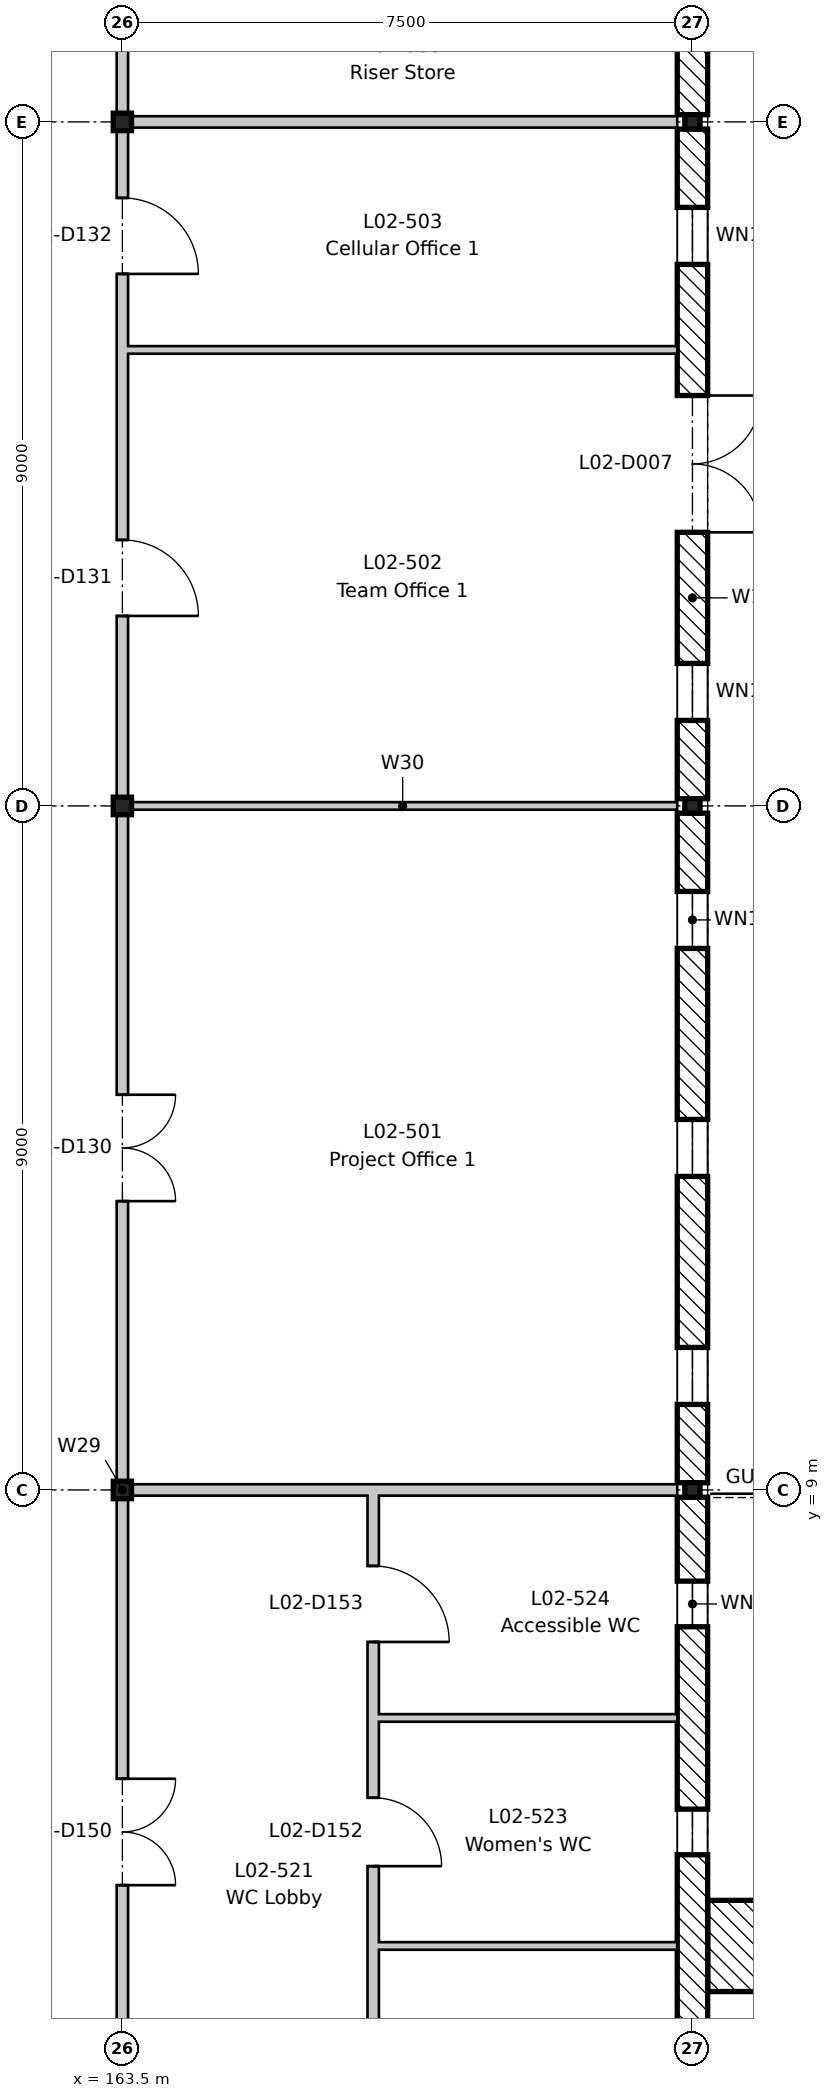
"""IFC4 building model, lengths in metres.
Left out: names, types, materials, properties, quantities, classifications, styles, units other than length and angle.
Written with IfcOpenShell. Run it as: python <this file> out.ifc"""

import sys

from ifc_helpers import new_model, si_unit, direction, frame, frame_2d, origin, origin_2d, place, context, subcontext, project, spatial, rectangle, i_section, extrude, element, fill, save


model = new_model("IFC4")
c1 = context("Model", 3, precision=1e-05, world=origin(), true_north=direction((0.0, 1.0)))
c2 = subcontext(c1, "Body", "Model", "MODEL_VIEW")
j1 = project(units=[si_unit("LENGTHUNIT", "METRE"), si_unit("PLANEANGLEUNIT", "RADIAN")], contexts=[c1])
p1 = place(None, origin())
s1 = spatial("IfcSite", under=j1, at=p1, CompositionType="ELEMENT")
p2 = place(p1, origin())
s2 = spatial("IfcBuilding", under=s1, at=p2, CompositionType="ELEMENT")
p3 = place(p2, frame((0.0, 0.0, 9.9)))
s3 = spatial("IfcBuildingStorey", under=s2, at=p3, CompositionType="ELEMENT", Elevation=9.9)
for number, where, z_axis, x_axis in (
    (1, (163.5, 9.0, -0.2), (0.0, 0.0, 1.0), (1.0, 0.0, 0.0)),
    (2, (163.5, 18.0, -0.2), (0.0, 0.0, 1.0), (1.0, 0.0, 0.0)),
    (3, (163.5, 27.0, -0.2), (0.0, 0.0, 1.0), (1.0, 0.0, 0.0)),
):
    element("IfcColumn", number, at=place(p3, frame(where, z_axis=z_axis, x_axis=x_axis)), inside=s3, PredefinedType="COLUMN", context=c2, shape_type="SweptSolid", body=[
        extrude(i_section(OverallWidth=0.24, OverallDepth=0.23, WebThickness=0.008, FlangeThickness=0.012, FilletRadius=0.021, at=origin_2d()), origin(), (0.0, 0.0, 1.0), 4.45),
    ])
for number, where, z_axis, x_axis in (
    (4, (171.0, 9.0, -0.2), (0.0, 0.0, 1.0), (1.0, 0.0, 0.0)),
    (5, (171.0, 18.0, -0.2), (0.0, 0.0, 1.0), (1.0, 0.0, 0.0)),
    (6, (171.0, 27.0, -0.2), (0.0, 0.0, 1.0), (1.0, 0.0, 0.0)),
):
    element("IfcColumn", number, at=place(p3, frame(where, z_axis=z_axis, x_axis=x_axis)), inside=s3, PredefinedType="COLUMN", context=c2, shape_type="SweptSolid", body=[
        extrude(i_section(OverallWidth=0.2, OverallDepth=0.19, WebThickness=0.007, FlangeThickness=0.01, FilletRadius=0.018, at=origin_2d()), origin(), (0.0, 0.0, 1.0), 4.45),
    ])
p4 = place(p3, frame((171.0, 8.905, 0.0), z_axis=(0.0, 0.0, 1.0), x_axis=(0.0, -1.0, 0.0)))
e7 = element("IfcWall", 7, at=p4, inside=s3, PredefinedType="STANDARD", context=c2, shape_type="SweptSolid", body=[
    extrude(rectangle(XDim=8.81, YDim=0.4, at=frame_2d((4.405, 0.0))), origin(), (0.0, 0.0, 1.0), 3.85),
])
p5 = place(p4, frame((7.105, 0.0, 1.5)))
e8 = element("IfcOpeningElement", 8, at=p5, cuts=e7, PredefinedType="OPENING", context=c2, shape_type="SweptSolid", body=[
    extrude(rectangle(XDim=0.6, YDim=1.2, at=frame_2d((0.3, 0.6))), frame((0.0, 0.21, 0.0), z_axis=(0.0, -1.0, 0.0), x_axis=(1.0, 0.0, 0.0)), (0.0, 0.0, 1.0), 0.42),
])
p6 = place(p4, frame((4.105, 0.0, 1.5)))
e9 = element("IfcOpeningElement", 9, at=p6, cuts=e7, PredefinedType="OPENING", context=c2, shape_type="SweptSolid", body=[
    extrude(rectangle(XDim=0.6, YDim=1.2, at=frame_2d((0.3, 0.6))), frame((0.0, 0.21, 0.0), z_axis=(0.0, -1.0, 0.0), x_axis=(1.0, 0.0, 0.0)), (0.0, 0.0, 1.0), 0.42),
])
p7 = place(p4, frame((1.105, 0.0, 1.5)))
e10 = element("IfcOpeningElement", 10, at=p7, cuts=e7, PredefinedType="OPENING", context=c2, shape_type="SweptSolid", body=[
    extrude(rectangle(XDim=0.6, YDim=1.2, at=frame_2d((0.3, 0.6))), frame((0.0, 0.21, 0.0), z_axis=(0.0, -1.0, 0.0), x_axis=(1.0, 0.0, 0.0)), (0.0, 0.0, 1.0), 0.42),
])
p8 = place(p3, frame((171.0, 17.905, 0.0), z_axis=(0.0, 0.0, 1.0), x_axis=(0.0, -1.0, 0.0)))
e11 = element("IfcWall", 11, at=p8, inside=s3, PredefinedType="STANDARD", context=c2, shape_type="SweptSolid", body=[
    extrude(rectangle(XDim=8.81, YDim=0.4, at=frame_2d((4.405, 0.0))), origin(), (0.0, 0.0, 1.0), 3.85),
])
p9 = place(p8, frame((7.03, 0.0, 1.5)))
e12 = element("IfcOpeningElement", 12, at=p9, cuts=e11, PredefinedType="OPENING", context=c2, shape_type="SweptSolid", body=[
    extrude(rectangle(XDim=0.75, YDim=1.2, at=frame_2d((0.375, 0.6))), frame((0.0, 0.21, 0.0), z_axis=(0.0, -1.0, 0.0), x_axis=(1.0, 0.0, 0.0)), (0.0, 0.0, 1.0), 0.42),
])
p10 = place(p8, frame((4.03, 0.0, 1.5)))
e13 = element("IfcOpeningElement", 13, at=p10, cuts=e11, PredefinedType="OPENING", context=c2, shape_type="SweptSolid", body=[
    extrude(rectangle(XDim=0.75, YDim=1.2, at=frame_2d((0.375, 0.6))), frame((0.0, 0.21, 0.0), z_axis=(0.0, -1.0, 0.0), x_axis=(1.0, 0.0, 0.0)), (0.0, 0.0, 1.0), 0.42),
])
p11 = place(p8, frame((1.03, 0.0, 1.5)))
e14 = element("IfcOpeningElement", 14, at=p11, cuts=e11, PredefinedType="OPENING", context=c2, shape_type="SweptSolid", body=[
    extrude(rectangle(XDim=0.75, YDim=1.2, at=frame_2d((0.375, 0.6))), frame((0.0, 0.21, 0.0), z_axis=(0.0, -1.0, 0.0), x_axis=(1.0, 0.0, 0.0)), (0.0, 0.0, 1.0), 0.42),
])
p12 = place(p3, frame((171.0, 26.905, 0.0), z_axis=(0.0, 0.0, 1.0), x_axis=(0.0, -1.0, 0.0)))
e15 = element("IfcWall", 15, at=p12, inside=s3, PredefinedType="STANDARD", context=c2, shape_type="SweptSolid", body=[
    extrude(rectangle(XDim=8.81, YDim=0.4, at=frame_2d((4.405, 0.0))), origin(), (0.0, 0.0, 1.0), 3.85),
])
p13 = place(p12, frame((3.505, 0.0, 0.0)))
e16 = element("IfcOpeningElement", 16, at=p13, cuts=e15, PredefinedType="OPENING", context=c2, shape_type="SweptSolid", body=[
    extrude(rectangle(XDim=1.8, YDim=2.4, at=frame_2d((0.9, 1.2))), frame((0.0, 0.21, 0.0), z_axis=(0.0, -1.0, 0.0), x_axis=(1.0, 0.0, 0.0)), (0.0, 0.0, 1.0), 0.42),
])
p14 = place(p12, frame((7.03, 0.0, 1.5)))
e17 = element("IfcOpeningElement", 17, at=p14, cuts=e15, PredefinedType="OPENING", context=c2, shape_type="SweptSolid", body=[
    extrude(rectangle(XDim=0.75, YDim=1.2, at=frame_2d((0.375, 0.6))), frame((0.0, 0.21, 0.0), z_axis=(0.0, -1.0, 0.0), x_axis=(1.0, 0.0, 0.0)), (0.0, 0.0, 1.0), 0.42),
])
p15 = place(p12, frame((1.03, 0.0, 1.5)))
e18 = element("IfcOpeningElement", 18, at=p15, cuts=e15, PredefinedType="OPENING", context=c2, shape_type="SweptSolid", body=[
    extrude(rectangle(XDim=0.75, YDim=1.2, at=frame_2d((0.375, 0.6))), frame((0.0, 0.21, 0.0), z_axis=(0.0, -1.0, 0.0), x_axis=(1.0, 0.0, 0.0)), (0.0, 0.0, 1.0), 0.42),
])
p16 = place(p3, frame((171.0, 35.905, 0.0), z_axis=(0.0, 0.0, 1.0), x_axis=(0.0, -1.0, 0.0)))
e19 = element("IfcWall", 19, at=p16, inside=s3, PredefinedType="STANDARD", context=c2, shape_type="SweptSolid", body=[
    extrude(rectangle(XDim=8.81, YDim=0.4, at=frame_2d((4.405, 0.0))), origin(), (0.0, 0.0, 1.0), 3.85),
])
p17 = place(p16, frame((3.805, 0.0, 0.9)))
e20 = element("IfcOpeningElement", 20, at=p17, cuts=e19, PredefinedType="OPENING", context=c2, shape_type="SweptSolid", body=[
    extrude(rectangle(XDim=1.2, YDim=2.7, at=frame_2d((0.6, 1.35))), frame((0.0, 0.21, 0.0), z_axis=(0.0, -1.0, 0.0), x_axis=(1.0, 0.0, 0.0)), (0.0, 0.0, 1.0), 0.42),
])
p18 = place(p16, frame((1.03, 0.0, 1.5)))
e21 = element("IfcOpeningElement", 21, at=p18, cuts=e19, PredefinedType="OPENING", context=c2, shape_type="SweptSolid", body=[
    extrude(rectangle(XDim=0.75, YDim=1.2, at=frame_2d((0.375, 0.6))), frame((0.0, 0.21, 0.0), z_axis=(0.0, -1.0, 0.0), x_axis=(1.0, 0.0, 0.0)), (0.0, 0.0, 1.0), 0.42),
])
p19 = place(p3, frame((171.8, 2.4, 0.0), z_axis=(0.0, 0.0, 1.0), x_axis=(0.0, 1.0, 0.0)))
e22 = element("IfcWall", 22, at=p19, inside=s3, PredefinedType="STANDARD", context=c2, shape_type="SweptSolid", body=[
    extrude(rectangle(XDim=1.2, YDim=1.2, at=frame_2d((0.6, 0.0))), origin(), (0.0, 0.0, 1.0), 3.65),
])
p20 = place(p3, frame((163.575, 9.0, 0.0), z_axis=(0.0, 0.0, 1.0), x_axis=(1.0, 0.0, 0.0)))
e23 = element("IfcWall", 23, at=p20, inside=s3, PredefinedType="PARTITIONING", context=c2, shape_type="SweptSolid", body=[
    extrude(rectangle(XDim=7.225, YDim=0.15, at=frame_2d((3.613, 0.0))), origin(), (0.0, 0.0, 1.0), 3.9),
])
p21 = place(p3, frame((163.575, 18.0, 0.0), z_axis=(0.0, 0.0, 1.0), x_axis=(1.0, 0.0, 0.0)))
e24 = element("IfcWall", 24, at=p21, inside=s3, PredefinedType="PARTITIONING", context=c2, shape_type="SweptSolid", body=[
    extrude(rectangle(XDim=7.225, YDim=0.1, at=frame_2d((3.613, 0.0))), origin(), (0.0, 0.0, 1.0), 3.9),
])
p22 = place(p3, frame((163.575, 24.0, 0.0), z_axis=(0.0, 0.0, 1.0), x_axis=(1.0, 0.0, 0.0)))
e25 = element("IfcWall", 25, at=p22, inside=s3, PredefinedType="PARTITIONING", context=c2, shape_type="SweptSolid", body=[
    extrude(rectangle(XDim=7.225, YDim=0.1, at=frame_2d((3.613, 0.0))), origin(), (0.0, 0.0, 1.0), 4.25),
])
p23 = place(p3, frame((163.575, 27.0, 0.0), z_axis=(0.0, 0.0, 1.0), x_axis=(1.0, 0.0, 0.0)))
e26 = element("IfcWall", 26, at=p23, inside=s3, PredefinedType="PARTITIONING", context=c2, shape_type="SweptSolid", body=[
    extrude(rectangle(XDim=7.225, YDim=0.15, at=frame_2d((3.613, 0.0))), origin(), (0.0, 0.0, 1.0), 3.9),
])
p24 = place(p3, frame((163.5, -8.8, 0.0), z_axis=(0.0, 0.0, 1.0), x_axis=(0.0, 1.0, 0.0)))
e27 = element("IfcWall", 27, at=p24, inside=s3, PredefinedType="PARTITIONING", context=c2, shape_type="SweptSolid", body=[
    extrude(rectangle(XDim=62.6, YDim=0.15, at=frame_2d((31.3, 0.0))), origin(), (0.0, 0.0, 1.0), 3.73),
])
p25 = place(p24, frame((21.6, 0.0, 0.0)))
e28 = element("IfcOpeningElement", 28, at=p25, cuts=e27, PredefinedType="OPENING", context=c2, shape_type="SweptSolid", body=[
    extrude(rectangle(XDim=1.4, YDim=2.1, at=frame_2d((0.7, 1.05))), frame((0.0, 0.085, 0.0), z_axis=(0.0, -1.0, 0.0), x_axis=(1.0, 0.0, 0.0)), (0.0, 0.0, 1.0), 0.17),
])
p26 = place(p24, frame((29.3, 0.0, 0.0)))
e29 = element("IfcOpeningElement", 29, at=p26, cuts=e27, PredefinedType="OPENING", context=c2, shape_type="SweptSolid", body=[
    extrude(rectangle(XDim=1.0, YDim=2.1, at=frame_2d((0.5, 1.05))), frame((0.0, 0.085, 0.0), z_axis=(0.0, -1.0, 0.0), x_axis=(1.0, 0.0, 0.0)), (0.0, 0.0, 1.0), 0.17),
])
p27 = place(p24, frame((33.8, 0.0, 0.0)))
e30 = element("IfcOpeningElement", 30, at=p27, cuts=e27, PredefinedType="OPENING", context=c2, shape_type="SweptSolid", body=[
    extrude(rectangle(XDim=1.0, YDim=2.1, at=frame_2d((0.5, 1.05))), frame((0.0, 0.085, 0.0), z_axis=(0.0, -1.0, 0.0), x_axis=(1.0, 0.0, 0.0)), (0.0, 0.0, 1.0), 0.17),
])
p28 = place(p24, frame((47.3, 0.0, 0.0)))
e31 = element("IfcOpeningElement", 31, at=p28, cuts=e27, PredefinedType="OPENING", context=c2, shape_type="SweptSolid", body=[
    extrude(rectangle(XDim=1.0, YDim=2.1, at=frame_2d((0.5, 1.05))), frame((0.0, 0.085, 0.0), z_axis=(0.0, -1.0, 0.0), x_axis=(1.0, 0.0, 0.0)), (0.0, 0.0, 1.0), 0.17),
])
p29 = place(p24, frame((51.8, 0.0, 0.0)))
e32 = element("IfcOpeningElement", 32, at=p29, cuts=e27, PredefinedType="OPENING", context=c2, shape_type="SweptSolid", body=[
    extrude(rectangle(XDim=1.0, YDim=2.1, at=frame_2d((0.5, 1.05))), frame((0.0, 0.085, 0.0), z_axis=(0.0, -1.0, 0.0), x_axis=(1.0, 0.0, 0.0)), (0.0, 0.0, 1.0), 0.17),
])
p30 = place(p24, frame((12.6, 0.0, 0.0)))
e33 = element("IfcOpeningElement", 33, at=p30, cuts=e27, PredefinedType="OPENING", context=c2, shape_type="SweptSolid", body=[
    extrude(rectangle(XDim=1.4, YDim=2.1, at=frame_2d((0.7, 1.05))), frame((0.0, 0.085, 0.0), z_axis=(0.0, -1.0, 0.0), x_axis=(1.0, 0.0, 0.0)), (0.0, 0.0, 1.0), 0.17),
])
p31 = place(p24, frame((3.6, 0.0, 0.0)))
e34 = element("IfcOpeningElement", 34, at=p31, cuts=e27, PredefinedType="OPENING", context=c2, shape_type="SweptSolid", body=[
    extrude(rectangle(XDim=1.4, YDim=2.1, at=frame_2d((0.7, 1.05))), frame((0.0, 0.085, 0.0), z_axis=(0.0, -1.0, 0.0), x_axis=(1.0, 0.0, 0.0)), (0.0, 0.0, 1.0), 0.17),
])
p32 = place(p24, frame((57.6, 0.0, 0.0)))
e35 = element("IfcOpeningElement", 35, at=p32, cuts=e27, PredefinedType="OPENING", context=c2, shape_type="SweptSolid", body=[
    extrude(rectangle(XDim=1.4, YDim=2.1, at=frame_2d((0.7, 1.05))), frame((0.0, 0.085, 0.0), z_axis=(0.0, -1.0, 0.0), x_axis=(1.0, 0.0, 0.0)), (0.0, 0.0, 1.0), 0.17),
])
p33 = place(p24, frame((36.75, 0.0, 0.0)))
e36 = element("IfcOpeningElement", 36, at=p33, cuts=e27, PredefinedType="OPENING", context=c2, shape_type="SweptSolid", body=[
    extrude(rectangle(XDim=1.0, YDim=2.1, at=frame_2d((0.5, 1.05))), frame((0.0, 0.085, 0.0), z_axis=(0.0, -1.0, 0.0), x_axis=(1.0, 0.0, 0.0)), (0.0, 0.0, 1.0), 0.17),
])
p34 = place(p24, frame((42.65, 0.0, 0.0)))
e37 = element("IfcOpeningElement", 37, at=p34, cuts=e27, PredefinedType="OPENING", context=c2, shape_type="SweptSolid", body=[
    extrude(rectangle(XDim=1.4, YDim=2.1, at=frame_2d((0.7, 1.05))), frame((0.0, 0.085, 0.0), z_axis=(0.0, -1.0, 0.0), x_axis=(1.0, 0.0, 0.0)), (0.0, 0.0, 1.0), 0.17),
])
p35 = place(p3, frame((166.8, 0.075, 0.0), z_axis=(0.0, 0.0, 1.0), x_axis=(0.0, 1.0, 0.0)))
e38 = element("IfcWall", 38, at=p35, inside=s3, PredefinedType="PARTITIONING", context=c2, shape_type="SweptSolid", body=[
    extrude(rectangle(XDim=8.85, YDim=0.15, at=frame_2d((4.425, 0.0))), origin(), (0.0, 0.0, 1.0), 4.25),
])
p36 = place(p35, frame((0.975, 0.0, 0.0)))
e39 = element("IfcOpeningElement", 39, at=p36, cuts=e38, PredefinedType="OPENING", context=c2, shape_type="SweptSolid", body=[
    extrude(rectangle(XDim=0.9, YDim=2.1, at=frame_2d((0.45, 1.05))), frame((0.0, 0.085, 0.0), z_axis=(0.0, -1.0, 0.0), x_axis=(1.0, 0.0, 0.0)), (0.0, 0.0, 1.0), 0.17),
])
p37 = place(p35, frame((3.975, 0.0, 0.0)))
e40 = element("IfcOpeningElement", 40, at=p37, cuts=e38, PredefinedType="OPENING", context=c2, shape_type="SweptSolid", body=[
    extrude(rectangle(XDim=0.9, YDim=2.1, at=frame_2d((0.45, 1.05))), frame((0.0, 0.085, 0.0), z_axis=(0.0, -1.0, 0.0), x_axis=(1.0, 0.0, 0.0)), (0.0, 0.0, 1.0), 0.17),
])
p38 = place(p35, frame((6.925, 0.0, 0.0)))
e41 = element("IfcOpeningElement", 41, at=p38, cuts=e38, PredefinedType="OPENING", context=c2, shape_type="SweptSolid", body=[
    extrude(rectangle(XDim=1.0, YDim=2.1, at=frame_2d((0.5, 1.05))), frame((0.0, 0.085, 0.0), z_axis=(0.0, -1.0, 0.0), x_axis=(1.0, 0.0, 0.0)), (0.0, 0.0, 1.0), 0.17),
])
for number, where, z_axis, x_axis in (
    (42, (166.875, 3.0, 0.0), (0.0, 0.0, 1.0), (1.0, 0.0, 0.0)),
    (43, (166.875, 6.0, 0.0), (0.0, 0.0, 1.0), (1.0, 0.0, 0.0)),
):
    element("IfcWall", number, at=place(p3, frame(where, z_axis=z_axis, x_axis=x_axis)), inside=s3, PredefinedType="PARTITIONING", context=c2, shape_type="SweptSolid", body=[
        extrude(rectangle(XDim=3.925, YDim=0.1, at=frame_2d((1.962, 0.0))), origin(), (0.0, 0.0, 1.0), 4.25),
    ])
p39 = place(p6, origin())
e44 = element("IfcWindow", 44, at=p39, inside=s3, PartitioningType="SINGLE_PANEL", PredefinedType="WINDOW", context=c2, shape_type="SweptSolid", body=[
    extrude(rectangle(XDim=0.6, YDim=1.2, at=frame_2d((0.3, 0.6))), frame((0.0, -0.12, 0.0), z_axis=(0.0, -1.0, 0.0), x_axis=(1.0, 0.0, 0.0)), (0.0, 0.0, 1.0), 0.06),
])
fill(e9, e44)
p40 = place(p7, origin())
e45 = element("IfcWindow", 45, at=p40, inside=s3, PartitioningType="SINGLE_PANEL", PredefinedType="WINDOW", context=c2, shape_type="SweptSolid", body=[
    extrude(rectangle(XDim=0.6, YDim=1.2, at=frame_2d((0.3, 0.6))), frame((0.0, -0.12, 0.0), z_axis=(0.0, -1.0, 0.0), x_axis=(1.0, 0.0, 0.0)), (0.0, 0.0, 1.0), 0.06),
])
fill(e10, e45)
p41 = place(p9, origin())
e46 = element("IfcWindow", 46, at=p41, inside=s3, PartitioningType="SINGLE_PANEL", PredefinedType="WINDOW", context=c2, shape_type="SweptSolid", body=[
    extrude(rectangle(XDim=0.75, YDim=1.2, at=frame_2d((0.375, 0.6))), frame((0.0, -0.12, 0.0), z_axis=(0.0, -1.0, 0.0), x_axis=(1.0, 0.0, 0.0)), (0.0, 0.0, 1.0), 0.06),
])
fill(e12, e46)
p42 = place(p10, origin())
e47 = element("IfcWindow", 47, at=p42, inside=s3, PartitioningType="SINGLE_PANEL", PredefinedType="WINDOW", context=c2, shape_type="SweptSolid", body=[
    extrude(rectangle(XDim=0.75, YDim=1.2, at=frame_2d((0.375, 0.6))), frame((0.0, -0.12, 0.0), z_axis=(0.0, -1.0, 0.0), x_axis=(1.0, 0.0, 0.0)), (0.0, 0.0, 1.0), 0.06),
])
fill(e13, e47)
p43 = place(p11, origin())
e48 = element("IfcWindow", 48, at=p43, inside=s3, PartitioningType="SINGLE_PANEL", PredefinedType="WINDOW", context=c2, shape_type="SweptSolid", body=[
    extrude(rectangle(XDim=0.75, YDim=1.2, at=frame_2d((0.375, 0.6))), frame((0.0, -0.12, 0.0), z_axis=(0.0, -1.0, 0.0), x_axis=(1.0, 0.0, 0.0)), (0.0, 0.0, 1.0), 0.06),
])
fill(e14, e48)
p44 = place(p13, origin())
e49 = element("IfcDoor", 49, at=p44, inside=s3, OperationType="DOUBLE_DOOR_SINGLE_SWING", PredefinedType="DOOR", context=c2, shape_type="SweptSolid", body=[
    extrude(rectangle(XDim=1.8, YDim=2.4, at=frame_2d((0.9, 1.2))), frame((0.0, 0.025, 0.0), z_axis=(0.0, -1.0, 0.0), x_axis=(1.0, 0.0, 0.0)), (0.0, 0.0, 1.0), 0.05),
])
fill(e16, e49)
p45 = place(p14, origin())
e50 = element("IfcWindow", 50, at=p45, inside=s3, PartitioningType="SINGLE_PANEL", PredefinedType="WINDOW", context=c2, shape_type="SweptSolid", body=[
    extrude(rectangle(XDim=0.75, YDim=1.2, at=frame_2d((0.375, 0.6))), frame((0.0, -0.12, 0.0), z_axis=(0.0, -1.0, 0.0), x_axis=(1.0, 0.0, 0.0)), (0.0, 0.0, 1.0), 0.06),
])
fill(e17, e50)
p46 = place(p15, origin())
e51 = element("IfcWindow", 51, at=p46, inside=s3, PartitioningType="SINGLE_PANEL", PredefinedType="WINDOW", context=c2, shape_type="SweptSolid", body=[
    extrude(rectangle(XDim=0.75, YDim=1.2, at=frame_2d((0.375, 0.6))), frame((0.0, -0.12, 0.0), z_axis=(0.0, -1.0, 0.0), x_axis=(1.0, 0.0, 0.0)), (0.0, 0.0, 1.0), 0.06),
])
fill(e18, e51)
p47 = place(p25, frame((1.4, 0.0, 0.0), z_axis=(0.0, 0.0, 1.0), x_axis=(-1.0, 0.0, 0.0)))
e52 = element("IfcDoor", 52, at=p47, inside=s3, OperationType="DOUBLE_DOOR_SINGLE_SWING", PredefinedType="DOOR", context=c2, shape_type="SweptSolid", body=[
    extrude(rectangle(XDim=1.4, YDim=2.1, at=frame_2d((0.7, 1.05))), frame((0.0, 0.025, 0.0), z_axis=(0.0, -1.0, 0.0), x_axis=(1.0, 0.0, 0.0)), (0.0, 0.0, 1.0), 0.05),
])
fill(e28, e52)
p48 = place(p26, frame((1.0, 0.0, 0.0), z_axis=(0.0, 0.0, 1.0), x_axis=(-1.0, 0.0, 0.0)))
e53 = element("IfcDoor", 53, at=p48, inside=s3, OperationType="SINGLE_SWING_RIGHT", PredefinedType="DOOR", context=c2, shape_type="SweptSolid", body=[
    extrude(rectangle(XDim=1.0, YDim=2.1, at=frame_2d((0.5, 1.05))), frame((0.0, 0.025, 0.0), z_axis=(0.0, -1.0, 0.0), x_axis=(1.0, 0.0, 0.0)), (0.0, 0.0, 1.0), 0.05),
])
fill(e29, e53)
p49 = place(p27, frame((1.0, 0.0, 0.0), z_axis=(0.0, 0.0, 1.0), x_axis=(-1.0, 0.0, 0.0)))
e54 = element("IfcDoor", 54, at=p49, inside=s3, OperationType="SINGLE_SWING_RIGHT", PredefinedType="DOOR", context=c2, shape_type="SweptSolid", body=[
    extrude(rectangle(XDim=1.0, YDim=2.1, at=frame_2d((0.5, 1.05))), frame((0.0, 0.025, 0.0), z_axis=(0.0, -1.0, 0.0), x_axis=(1.0, 0.0, 0.0)), (0.0, 0.0, 1.0), 0.05),
])
fill(e30, e54)
p50 = place(p30, frame((1.4, 0.0, 0.0), z_axis=(0.0, 0.0, 1.0), x_axis=(-1.0, 0.0, 0.0)))
e55 = element("IfcDoor", 55, at=p50, inside=s3, OperationType="DOUBLE_DOOR_SINGLE_SWING", PredefinedType="DOOR", context=c2, shape_type="SweptSolid", body=[
    extrude(rectangle(XDim=1.4, YDim=2.1, at=frame_2d((0.7, 1.05))), frame((0.0, 0.025, 0.0), z_axis=(0.0, -1.0, 0.0), x_axis=(1.0, 0.0, 0.0)), (0.0, 0.0, 1.0), 0.05),
])
fill(e33, e55)
p51 = place(p37, frame((0.9, 0.0, 0.0), z_axis=(0.0, 0.0, 1.0), x_axis=(-1.0, 0.0, 0.0)))
e56 = element("IfcDoor", 56, at=p51, inside=s3, OperationType="SINGLE_SWING_RIGHT", PredefinedType="DOOR", context=c2, shape_type="SweptSolid", body=[
    extrude(rectangle(XDim=0.9, YDim=2.1, at=frame_2d((0.45, 1.05))), frame((0.0, 0.025, 0.0), z_axis=(0.0, -1.0, 0.0), x_axis=(1.0, 0.0, 0.0)), (0.0, 0.0, 1.0), 0.05),
])
fill(e40, e56)
p52 = place(p38, frame((1.0, 0.0, 0.0), z_axis=(0.0, 0.0, 1.0), x_axis=(-1.0, 0.0, 0.0)))
e57 = element("IfcDoor", 57, at=p52, inside=s3, OperationType="SINGLE_SWING_RIGHT", PredefinedType="DOOR", context=c2, shape_type="SweptSolid", body=[
    extrude(rectangle(XDim=1.0, YDim=2.1, at=frame_2d((0.5, 1.05))), frame((0.0, 0.025, 0.0), z_axis=(0.0, -1.0, 0.0), x_axis=(1.0, 0.0, 0.0)), (0.0, 0.0, 1.0), 0.05),
])
fill(e41, e57)
save(model, sys.argv[1])
